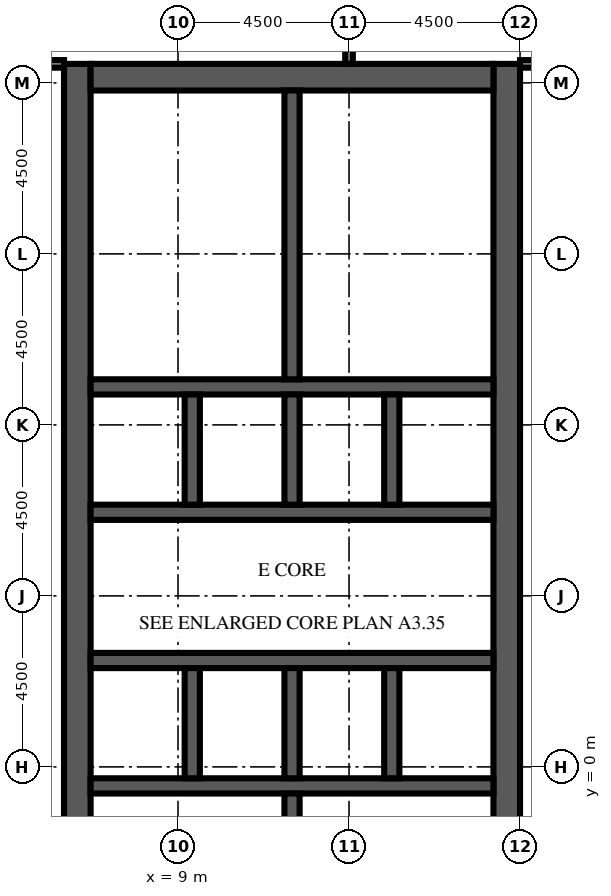
"""IFC4 building model, lengths in metres.
Left out: names, types, materials, properties, quantities, classifications, styles, units other than length and angle.
Written with IfcOpenShell. Run it as: python <this file> out.ifc"""

import sys

from ifc_helpers import new_model, si_unit, direction, frame, frame_2d, origin, place, context, subcontext, project, spatial, rectangle, extrude, element, fill, save


model = new_model("IFC4")
c1 = context("Model", 3, precision=1e-05, world=origin(), true_north=direction((0.0, 1.0)))
c2 = subcontext(c1, "Body", "Model", "MODEL_VIEW")
j1 = project(units=[si_unit("LENGTHUNIT", "METRE"), si_unit("PLANEANGLEUNIT", "RADIAN")], contexts=[c1])
p1 = place(None, origin())
s1 = spatial("IfcSite", under=j1, at=p1, CompositionType="ELEMENT")
p2 = place(p1, origin())
s2 = spatial("IfcBuilding", under=s1, at=p2, CompositionType="ELEMENT")
p3 = place(p2, frame((0.0, 0.0, 231.6)))
s3 = spatial("IfcBuildingStorey", under=s2, at=p3, CompositionType="ELEMENT", Elevation=231.6)
p4 = place(p3, frame((6.35, -9.0, 0.0), z_axis=(0.0, 0.0, 1.0), x_axis=(0.0, 1.0, 0.0)))
e1 = element("IfcWall", 1, at=p4, inside=s3, PredefinedType="SHEAR", context=c2, shape_type="SweptSolid", body=[
    extrude(rectangle(XDim=27.5, YDim=0.7, at=frame_2d((13.75, 0.0))), origin(), (0.0, 0.0, 1.0), 4.1),
])
p5 = place(p4, frame((12.55, 0.0, 0.0)))
e2 = element("IfcOpeningElement", 2, at=p5, cuts=e1, PredefinedType="OPENING", context=c2, shape_type="SweptSolid", body=[
    extrude(rectangle(XDim=2.4, YDim=2.4, at=frame_2d((1.2, 1.2))), frame((0.0, 0.36, 0.0), z_axis=(0.0, -1.0, 0.0), x_axis=(1.0, 0.0, 0.0)), (0.0, 0.0, 1.0), 0.72),
])
p6 = place(p4, frame((5.42, 0.0, 0.0)))
e3 = element("IfcOpeningElement", 3, at=p6, cuts=e1, PredefinedType="OPENING", context=c2, shape_type="SweptSolid", body=[
    extrude(rectangle(XDim=1.2, YDim=2.1, at=frame_2d((0.6, 1.05))), frame((0.0, 0.36, 0.0), z_axis=(0.0, -1.0, 0.0), x_axis=(1.0, 0.0, 0.0)), (0.0, 0.0, 1.0), 0.72),
])
p7 = place(p4, frame((19.46, 0.0, 0.0)))
e4 = element("IfcOpeningElement", 4, at=p7, cuts=e1, PredefinedType="OPENING", context=c2, shape_type="SweptSolid", body=[
    extrude(rectangle(XDim=1.0, YDim=2.1, at=frame_2d((0.5, 1.05))), frame((0.0, 0.36, 0.0), z_axis=(0.0, -1.0, 0.0), x_axis=(1.0, 0.0, 0.0)), (0.0, 0.0, 1.0), 0.72),
])
p8 = place(p4, frame((21.17, 0.0, 0.0)))
e5 = element("IfcOpeningElement", 5, at=p8, cuts=e1, PredefinedType="OPENING", context=c2, shape_type="SweptSolid", body=[
    extrude(rectangle(XDim=1.0, YDim=2.1, at=frame_2d((0.5, 1.05))), frame((0.0, 0.36, 0.0), z_axis=(0.0, -1.0, 0.0), x_axis=(1.0, 0.0, 0.0)), (0.0, 0.0, 1.0), 0.72),
])
p9 = place(p4, frame((23.26, 0.0, 0.0)))
e6 = element("IfcOpeningElement", 6, at=p9, cuts=e1, PredefinedType="OPENING", context=c2, shape_type="SweptSolid", body=[
    extrude(rectangle(XDim=1.0, YDim=2.1, at=frame_2d((0.5, 1.05))), frame((0.0, 0.36, 0.0), z_axis=(0.0, -1.0, 0.0), x_axis=(1.0, 0.0, 0.0)), (0.0, 0.0, 1.0), 0.72),
])
p10 = place(p4, frame((25.35, 0.0, 0.0)))
e7 = element("IfcOpeningElement", 7, at=p10, cuts=e1, PredefinedType="OPENING", context=c2, shape_type="SweptSolid", body=[
    extrude(rectangle(XDim=1.0, YDim=2.1, at=frame_2d((0.5, 1.05))), frame((0.0, 0.36, 0.0), z_axis=(0.0, -1.0, 0.0), x_axis=(1.0, 0.0, 0.0)), (0.0, 0.0, 1.0), 0.72),
])
p11 = place(p3, frame((17.65, -9.0, 0.0), z_axis=(0.0, 0.0, 1.0), x_axis=(0.0, 1.0, 0.0)))
e8 = element("IfcWall", 8, at=p11, inside=s3, PredefinedType="SHEAR", context=c2, shape_type="SweptSolid", body=[
    extrude(rectangle(XDim=27.5, YDim=0.7, at=frame_2d((13.75, 0.0))), origin(), (0.0, 0.0, 1.0), 4.1),
])
p12 = place(p11, frame((12.55, 0.0, 0.0)))
e9 = element("IfcOpeningElement", 9, at=p12, cuts=e8, PredefinedType="OPENING", context=c2, shape_type="SweptSolid", body=[
    extrude(rectangle(XDim=2.4, YDim=2.4, at=frame_2d((1.2, 1.2))), frame((0.0, 0.36, 0.0), z_axis=(0.0, -1.0, 0.0), x_axis=(1.0, 0.0, 0.0)), (0.0, 0.0, 1.0), 0.72),
])
p13 = place(p11, frame((6.825, 0.0, 0.0)))
e10 = element("IfcOpeningElement", 10, at=p13, cuts=e8, PredefinedType="OPENING", context=c2, shape_type="SweptSolid", body=[
    extrude(rectangle(XDim=1.2, YDim=2.1, at=frame_2d((0.6, 1.05))), frame((0.0, 0.36, 0.0), z_axis=(0.0, -1.0, 0.0), x_axis=(1.0, 0.0, 0.0)), (0.0, 0.0, 1.0), 0.72),
])
p14 = place(p11, frame((19.475, 0.0, 0.0)))
e11 = element("IfcOpeningElement", 11, at=p14, cuts=e8, PredefinedType="OPENING", context=c2, shape_type="SweptSolid", body=[
    extrude(rectangle(XDim=1.2, YDim=2.1, at=frame_2d((0.6, 1.05))), frame((0.0, 0.36, 0.0), z_axis=(0.0, -1.0, 0.0), x_axis=(1.0, 0.0, 0.0)), (0.0, 0.0, 1.0), 0.72),
])
p15 = place(p3, frame((6.7, 18.15, 0.0), z_axis=(0.0, 0.0, 1.0), x_axis=(1.0, 0.0, 0.0)))
e12 = element("IfcWall", 12, at=p15, inside=s3, PredefinedType="SHEAR", context=c2, shape_type="SweptSolid", body=[
    extrude(rectangle(XDim=10.6, YDim=0.7, at=frame_2d((5.3, 0.0))), origin(), (0.0, 0.0, 1.0), 4.1),
])
p16 = place(p3, frame((6.7, -0.5, 0.0), z_axis=(0.0, 0.0, 1.0), x_axis=(1.0, 0.0, 0.0)))
e13 = element("IfcWall", 13, at=p16, inside=s3, PredefinedType="SHEAR", context=c2, shape_type="SweptSolid", body=[
    extrude(rectangle(XDim=10.6, YDim=0.4, at=frame_2d((5.3, 0.0))), origin(), (0.0, 0.0, 1.0), 4.1),
])
p17 = place(p3, frame((6.7, 2.8, 0.0), z_axis=(0.0, 0.0, 1.0), x_axis=(1.0, 0.0, 0.0)))
e14 = element("IfcWall", 14, at=p17, inside=s3, PredefinedType="SHEAR", context=c2, shape_type="SweptSolid", body=[
    extrude(rectangle(XDim=10.6, YDim=0.4, at=frame_2d((5.3, 0.0))), origin(), (0.0, 0.0, 1.0), 4.1),
])
p18 = place(p17, frame((0.688, 0.0, 0.0)))
e15 = element("IfcOpeningElement", 15, at=p18, cuts=e14, PredefinedType="OPENING", context=c2, shape_type="SweptSolid", body=[
    extrude(rectangle(XDim=1.1, YDim=2.1, at=frame_2d((0.55, 1.05))), frame((0.0, 0.21, 0.0), z_axis=(0.0, -1.0, 0.0), x_axis=(1.0, 0.0, 0.0)), (0.0, 0.0, 1.0), 0.42),
])
p19 = place(p17, frame((3.438, 0.0, 0.0)))
e16 = element("IfcOpeningElement", 16, at=p19, cuts=e14, PredefinedType="OPENING", context=c2, shape_type="SweptSolid", body=[
    extrude(rectangle(XDim=1.1, YDim=2.1, at=frame_2d((0.55, 1.05))), frame((0.0, 0.21, 0.0), z_axis=(0.0, -1.0, 0.0), x_axis=(1.0, 0.0, 0.0)), (0.0, 0.0, 1.0), 0.42),
])
p20 = place(p17, frame((6.113, 0.0, 0.0)))
e17 = element("IfcOpeningElement", 17, at=p20, cuts=e14, PredefinedType="OPENING", context=c2, shape_type="SweptSolid", body=[
    extrude(rectangle(XDim=1.0, YDim=2.1, at=frame_2d((0.5, 1.05))), frame((0.0, 0.21, 0.0), z_axis=(0.0, -1.0, 0.0), x_axis=(1.0, 0.0, 0.0)), (0.0, 0.0, 1.0), 0.42),
])
p21 = place(p17, frame((8.863, 0.0, 0.0)))
e18 = element("IfcOpeningElement", 18, at=p21, cuts=e14, PredefinedType="OPENING", context=c2, shape_type="SweptSolid", body=[
    extrude(rectangle(XDim=1.0, YDim=2.1, at=frame_2d((0.5, 1.05))), frame((0.0, 0.21, 0.0), z_axis=(0.0, -1.0, 0.0), x_axis=(1.0, 0.0, 0.0)), (0.0, 0.0, 1.0), 0.42),
])
p22 = place(p3, frame((6.7, 6.7, 0.0), z_axis=(0.0, 0.0, 1.0), x_axis=(1.0, 0.0, 0.0)))
e19 = element("IfcWall", 19, at=p22, inside=s3, PredefinedType="SHEAR", context=c2, shape_type="SweptSolid", body=[
    extrude(rectangle(XDim=10.6, YDim=0.4, at=frame_2d((5.3, 0.0))), origin(), (0.0, 0.0, 1.0), 4.1),
])
p23 = place(p22, frame((3.438, 0.0, 0.0)))
e20 = element("IfcOpeningElement", 20, at=p23, cuts=e19, PredefinedType="OPENING", context=c2, shape_type="SweptSolid", body=[
    extrude(rectangle(XDim=1.1, YDim=2.1, at=frame_2d((0.55, 1.05))), frame((0.0, 0.21, 0.0), z_axis=(0.0, -1.0, 0.0), x_axis=(1.0, 0.0, 0.0)), (0.0, 0.0, 1.0), 0.42),
])
p24 = place(p22, frame((6.062, 0.0, 0.0)))
e21 = element("IfcOpeningElement", 21, at=p24, cuts=e19, PredefinedType="OPENING", context=c2, shape_type="SweptSolid", body=[
    extrude(rectangle(XDim=1.1, YDim=2.1, at=frame_2d((0.55, 1.05))), frame((0.0, 0.21, 0.0), z_axis=(0.0, -1.0, 0.0), x_axis=(1.0, 0.0, 0.0)), (0.0, 0.0, 1.0), 0.42),
])
p25 = place(p22, frame((8.812, 0.0, 0.0)))
e22 = element("IfcOpeningElement", 22, at=p25, cuts=e19, PredefinedType="OPENING", context=c2, shape_type="SweptSolid", body=[
    extrude(rectangle(XDim=1.1, YDim=2.1, at=frame_2d((0.55, 1.05))), frame((0.0, 0.21, 0.0), z_axis=(0.0, -1.0, 0.0), x_axis=(1.0, 0.0, 0.0)), (0.0, 0.0, 1.0), 0.42),
])
p26 = place(p22, frame((0.738, 0.0, 0.0)))
e23 = element("IfcOpeningElement", 23, at=p26, cuts=e19, PredefinedType="OPENING", context=c2, shape_type="SweptSolid", body=[
    extrude(rectangle(XDim=1.0, YDim=2.1, at=frame_2d((0.5, 1.05))), frame((0.0, 0.21, 0.0), z_axis=(0.0, -1.0, 0.0), x_axis=(1.0, 0.0, 0.0)), (0.0, 0.0, 1.0), 0.42),
])
p27 = place(p3, frame((6.7, 10.0, 0.0), z_axis=(0.0, 0.0, 1.0), x_axis=(1.0, 0.0, 0.0)))
e24 = element("IfcWall", 24, at=p27, inside=s3, PredefinedType="SHEAR", context=c2, shape_type="SweptSolid", body=[
    extrude(rectangle(XDim=10.6, YDim=0.4, at=frame_2d((5.3, 0.0))), origin(), (0.0, 0.0, 1.0), 4.1),
])
for number, where, z_axis, x_axis in (
    (25, (9.375, -0.3, 0.0), (0.0, 0.0, 1.0), (0.0, 1.0, 0.0)),
    (26, (9.375, 6.9, 0.0), (0.0, 0.0, 1.0), (0.0, 1.0, 0.0)),
    (27, (12.0, -0.3, 0.0), (0.0, 0.0, 1.0), (0.0, 1.0, 0.0)),
    (28, (12.0, 6.9, 0.0), (0.0, 0.0, 1.0), (0.0, 1.0, 0.0)),
    (29, (14.625, -0.3, 0.0), (0.0, 0.0, 1.0), (0.0, 1.0, 0.0)),
    (30, (14.625, 6.9, 0.0), (0.0, 0.0, 1.0), (0.0, 1.0, 0.0)),
):
    element("IfcWall", number, at=place(p3, frame(where, z_axis=z_axis, x_axis=x_axis)), inside=s3, PredefinedType="SHEAR", context=c2, shape_type="SweptSolid", body=[
        extrude(rectangle(XDim=2.9, YDim=0.4, at=frame_2d((1.45, 0.0))), origin(), (0.0, 0.0, 1.0), 4.1),
    ])
for number, where, z_axis, x_axis in (
    (31, (12.0, -8.3, 0.0), (0.0, 0.0, 1.0), (0.0, 1.0, 0.0)),
    (32, (12.0, 10.2, 0.0), (0.0, 0.0, 1.0), (0.0, 1.0, 0.0)),
):
    element("IfcWall", number, at=place(p3, frame(where, z_axis=z_axis, x_axis=x_axis)), inside=s3, PredefinedType="SHEAR", context=c2, shape_type="SweptSolid", body=[
        extrude(rectangle(XDim=7.6, YDim=0.4, at=frame_2d((3.8, 0.0))), origin(), (0.0, 0.0, 1.0), 4.1),
    ])
p28 = place(p3, frame((8.2, -2.98, 0.0), z_axis=(0.0, 0.0, 1.0), x_axis=(0.0, 1.0, 0.0)))
e33 = element("IfcWall", 33, at=p28, inside=s3, PredefinedType="PARTITIONING", context=c2, shape_type="SweptSolid", body=[
    extrude(rectangle(XDim=2.28, YDim=0.1, at=frame_2d((1.14, 0.0))), origin(), (0.0, 0.0, 1.0), 3.65),
])
p29 = place(p28, frame((0.64, 0.0, 0.0)))
e34 = element("IfcOpeningElement", 34, at=p29, cuts=e33, PredefinedType="OPENING", context=c2, shape_type="SweptSolid", body=[
    extrude(rectangle(XDim=1.0, YDim=2.1, at=frame_2d((0.5, 1.05))), frame((0.0, 0.06, 0.0), z_axis=(0.0, -1.0, 0.0), x_axis=(1.0, 0.0, 0.0)), (0.0, 0.0, 1.0), 0.12),
])
for number, where, z_axis, x_axis in (
    (35, (6.7, 11.72, 0.0), (0.0, 0.0, 1.0), (1.0, 0.0, 0.0)),
    (36, (6.7, 13.62, 0.0), (0.0, 0.0, 1.0), (1.0, 0.0, 0.0)),
    (37, (6.7, 15.9, 0.0), (0.0, 0.0, 1.0), (1.0, 0.0, 0.0)),
):
    element("IfcWall", number, at=place(p3, frame(where, z_axis=z_axis, x_axis=x_axis)), inside=s3, PredefinedType="PARTITIONING", context=c2, shape_type="SweptSolid", body=[
        extrude(rectangle(XDim=5.1, YDim=0.1, at=frame_2d((2.55, 0.0))), origin(), (0.0, 0.0, 1.0), 3.65),
    ])
p30 = place(p3, frame((13.5, 18.5, 0.0), z_axis=(0.0, 0.0, 1.0), x_axis=(0.0, 1.0, 0.0)))
e38 = element("IfcWall", 38, at=p30, inside=s3, PredefinedType="PARTITIONING", context=c2, shape_type="SweptSolid", body=[
    extrude(rectangle(XDim=8.1, YDim=0.2, at=frame_2d((4.05, 0.0))), origin(), (0.0, 0.0, 1.0), 3.65),
])
p31 = place(p3, frame((1.5, 18.5, 0.0), z_axis=(0.0, 0.0, 1.0), x_axis=(1.0, 0.0, 0.0)))
e39 = element("IfcWall", 39, at=p31, inside=s3, PredefinedType="PARTITIONING", context=c2, shape_type="SweptSolid", body=[
    extrude(rectangle(XDim=4.5, YDim=0.2, at=frame_2d((2.25, 0.0))), origin(), (0.0, 0.0, 1.0), 3.65),
])
p32 = place(p31, frame((1.85, 0.0, 0.0)))
e40 = element("IfcOpeningElement", 40, at=p32, cuts=e39, PredefinedType="OPENING", context=c2, shape_type="SweptSolid", body=[
    extrude(rectangle(XDim=1.0, YDim=2.1, at=frame_2d((0.5, 1.05))), frame((0.0, 0.11, 0.0), z_axis=(0.0, -1.0, 0.0), x_axis=(1.0, 0.0, 0.0)), (0.0, 0.0, 1.0), 0.22),
])
p33 = place(p3, frame((18.0, 18.5, 0.0), z_axis=(0.0, 0.0, 1.0), x_axis=(1.0, 0.0, 0.0)))
e41 = element("IfcWall", 41, at=p33, inside=s3, PredefinedType="PARTITIONING", context=c2, shape_type="SweptSolid", body=[
    extrude(rectangle(XDim=3.0, YDim=0.2, at=frame_2d((1.5, 0.0))), origin(), (0.0, 0.0, 1.0), 3.65),
])
p34 = place(p33, frame((1.35, 0.0, 0.0)))
e42 = element("IfcOpeningElement", 42, at=p34, cuts=e41, PredefinedType="OPENING", context=c2, shape_type="SweptSolid", body=[
    extrude(rectangle(XDim=1.0, YDim=2.1, at=frame_2d((0.5, 1.05))), frame((0.0, 0.11, 0.0), z_axis=(0.0, -1.0, 0.0), x_axis=(1.0, 0.0, 0.0)), (0.0, 0.0, 1.0), 0.22),
])
p35 = place(p18, origin())
e43 = element("IfcDoor", 43, at=p35, inside=s3, OperationType="DOUBLE_DOOR_SLIDING", PredefinedType="DOOR", context=c2, shape_type="SweptSolid", body=[
    extrude(rectangle(XDim=1.1, YDim=2.1, at=frame_2d((0.55, 1.05))), frame((0.0, 0.025, 0.0), z_axis=(0.0, -1.0, 0.0), x_axis=(1.0, 0.0, 0.0)), (0.0, 0.0, 1.0), 0.05),
])
fill(e15, e43)
p36 = place(p19, origin())
e44 = element("IfcDoor", 44, at=p36, inside=s3, OperationType="DOUBLE_DOOR_SLIDING", PredefinedType="DOOR", context=c2, shape_type="SweptSolid", body=[
    extrude(rectangle(XDim=1.1, YDim=2.1, at=frame_2d((0.55, 1.05))), frame((0.0, 0.025, 0.0), z_axis=(0.0, -1.0, 0.0), x_axis=(1.0, 0.0, 0.0)), (0.0, 0.0, 1.0), 0.05),
])
fill(e16, e44)
p37 = place(p23, origin())
e45 = element("IfcDoor", 45, at=p37, inside=s3, OperationType="DOUBLE_DOOR_SLIDING", PredefinedType="DOOR", context=c2, shape_type="SweptSolid", body=[
    extrude(rectangle(XDim=1.1, YDim=2.1, at=frame_2d((0.55, 1.05))), frame((0.0, 0.025, 0.0), z_axis=(0.0, -1.0, 0.0), x_axis=(1.0, 0.0, 0.0)), (0.0, 0.0, 1.0), 0.05),
])
fill(e20, e45)
p38 = place(p24, origin())
e46 = element("IfcDoor", 46, at=p38, inside=s3, OperationType="DOUBLE_DOOR_SLIDING", PredefinedType="DOOR", context=c2, shape_type="SweptSolid", body=[
    extrude(rectangle(XDim=1.1, YDim=2.1, at=frame_2d((0.55, 1.05))), frame((0.0, 0.025, 0.0), z_axis=(0.0, -1.0, 0.0), x_axis=(1.0, 0.0, 0.0)), (0.0, 0.0, 1.0), 0.05),
])
fill(e21, e46)
p39 = place(p25, origin())
e47 = element("IfcDoor", 47, at=p39, inside=s3, OperationType="DOUBLE_DOOR_SLIDING", PredefinedType="DOOR", context=c2, shape_type="SweptSolid", body=[
    extrude(rectangle(XDim=1.1, YDim=2.1, at=frame_2d((0.55, 1.05))), frame((0.0, 0.025, 0.0), z_axis=(0.0, -1.0, 0.0), x_axis=(1.0, 0.0, 0.0)), (0.0, 0.0, 1.0), 0.05),
])
fill(e22, e47)
p40 = place(p5, origin())
e48 = element("IfcDoor", 48, at=p40, inside=s3, OperationType="DOUBLE_DOOR_DOUBLE_SWING", PredefinedType="DOOR", context=c2, shape_type="SweptSolid", body=[
    extrude(rectangle(XDim=2.4, YDim=2.4, at=frame_2d((1.2, 1.2))), frame((0.0, 0.025, 0.0), z_axis=(0.0, -1.0, 0.0), x_axis=(1.0, 0.0, 0.0)), (0.0, 0.0, 1.0), 0.05),
])
fill(e2, e48)
p41 = place(p12, origin())
e49 = element("IfcDoor", 49, at=p41, inside=s3, OperationType="DOUBLE_DOOR_DOUBLE_SWING", PredefinedType="DOOR", context=c2, shape_type="SweptSolid", body=[
    extrude(rectangle(XDim=2.4, YDim=2.4, at=frame_2d((1.2, 1.2))), frame((0.0, 0.025, 0.0), z_axis=(0.0, -1.0, 0.0), x_axis=(1.0, 0.0, 0.0)), (0.0, 0.0, 1.0), 0.05),
])
fill(e9, e49)
p42 = place(p13, frame((1.2, 0.0, 0.0), z_axis=(0.0, 0.0, 1.0), x_axis=(-1.0, 0.0, 0.0)))
e50 = element("IfcDoor", 50, at=p42, inside=s3, OperationType="SINGLE_SWING_LEFT", PredefinedType="DOOR", context=c2, shape_type="SweptSolid", body=[
    extrude(rectangle(XDim=1.2, YDim=2.1, at=frame_2d((0.6, 1.05))), frame((0.0, 0.025, 0.0), z_axis=(0.0, -1.0, 0.0), x_axis=(1.0, 0.0, 0.0)), (0.0, 0.0, 1.0), 0.05),
])
fill(e10, e50)
p43 = place(p14, frame((1.2, 0.0, 0.0), z_axis=(0.0, 0.0, 1.0), x_axis=(-1.0, 0.0, 0.0)))
e51 = element("IfcDoor", 51, at=p43, inside=s3, OperationType="SINGLE_SWING_LEFT", PredefinedType="DOOR", context=c2, shape_type="SweptSolid", body=[
    extrude(rectangle(XDim=1.2, YDim=2.1, at=frame_2d((0.6, 1.05))), frame((0.0, 0.025, 0.0), z_axis=(0.0, -1.0, 0.0), x_axis=(1.0, 0.0, 0.0)), (0.0, 0.0, 1.0), 0.05),
])
fill(e11, e51)
p44 = place(p20, origin())
e52 = element("IfcDoor", 52, at=p44, inside=s3, OperationType="SINGLE_SWING_LEFT", PredefinedType="DOOR", context=c2, shape_type="SweptSolid", body=[
    extrude(rectangle(XDim=1.0, YDim=2.1, at=frame_2d((0.5, 1.05))), frame((0.0, 0.025, 0.0), z_axis=(0.0, -1.0, 0.0), x_axis=(1.0, 0.0, 0.0)), (0.0, 0.0, 1.0), 0.05),
])
fill(e17, e52)
p45 = place(p21, origin())
e53 = element("IfcDoor", 53, at=p45, inside=s3, OperationType="SINGLE_SWING_RIGHT", PredefinedType="DOOR", context=c2, shape_type="SweptSolid", body=[
    extrude(rectangle(XDim=1.0, YDim=2.1, at=frame_2d((0.5, 1.05))), frame((0.0, 0.025, 0.0), z_axis=(0.0, -1.0, 0.0), x_axis=(1.0, 0.0, 0.0)), (0.0, 0.0, 1.0), 0.05),
])
fill(e18, e53)
p46 = place(p26, origin())
e54 = element("IfcDoor", 54, at=p46, inside=s3, OperationType="SINGLE_SWING_LEFT", PredefinedType="DOOR", context=c2, shape_type="SweptSolid", body=[
    extrude(rectangle(XDim=1.0, YDim=2.1, at=frame_2d((0.5, 1.05))), frame((0.0, 0.025, 0.0), z_axis=(0.0, -1.0, 0.0), x_axis=(1.0, 0.0, 0.0)), (0.0, 0.0, 1.0), 0.05),
])
fill(e23, e54)
p47 = place(p7, origin())
e55 = element("IfcDoor", 55, at=p47, inside=s3, OperationType="SINGLE_SWING_RIGHT", PredefinedType="DOOR", context=c2, shape_type="SweptSolid", body=[
    extrude(rectangle(XDim=1.0, YDim=2.1, at=frame_2d((0.5, 1.05))), frame((0.0, -0.275, 0.0), z_axis=(0.0, -1.0, 0.0), x_axis=(1.0, 0.0, 0.0)), (0.0, 0.0, 1.0), 0.05),
])
fill(e4, e55)
p48 = place(p8, origin())
e56 = element("IfcDoor", 56, at=p48, inside=s3, OperationType="SINGLE_SWING_LEFT", PredefinedType="DOOR", context=c2, shape_type="SweptSolid", body=[
    extrude(rectangle(XDim=1.0, YDim=2.1, at=frame_2d((0.5, 1.05))), frame((0.0, -0.275, 0.0), z_axis=(0.0, -1.0, 0.0), x_axis=(1.0, 0.0, 0.0)), (0.0, 0.0, 1.0), 0.05),
])
fill(e5, e56)
p49 = place(p9, origin())
e57 = element("IfcDoor", 57, at=p49, inside=s3, OperationType="SINGLE_SWING_RIGHT", PredefinedType="DOOR", context=c2, shape_type="SweptSolid", body=[
    extrude(rectangle(XDim=1.0, YDim=2.1, at=frame_2d((0.5, 1.05))), frame((0.0, -0.275, 0.0), z_axis=(0.0, -1.0, 0.0), x_axis=(1.0, 0.0, 0.0)), (0.0, 0.0, 1.0), 0.05),
])
fill(e6, e57)
p50 = place(p10, origin())
e58 = element("IfcDoor", 58, at=p50, inside=s3, OperationType="SINGLE_SWING_LEFT", PredefinedType="DOOR", context=c2, shape_type="SweptSolid", body=[
    extrude(rectangle(XDim=1.0, YDim=2.1, at=frame_2d((0.5, 1.05))), frame((0.0, -0.275, 0.0), z_axis=(0.0, -1.0, 0.0), x_axis=(1.0, 0.0, 0.0)), (0.0, 0.0, 1.0), 0.05),
])
fill(e7, e58)
save(model, sys.argv[1])
